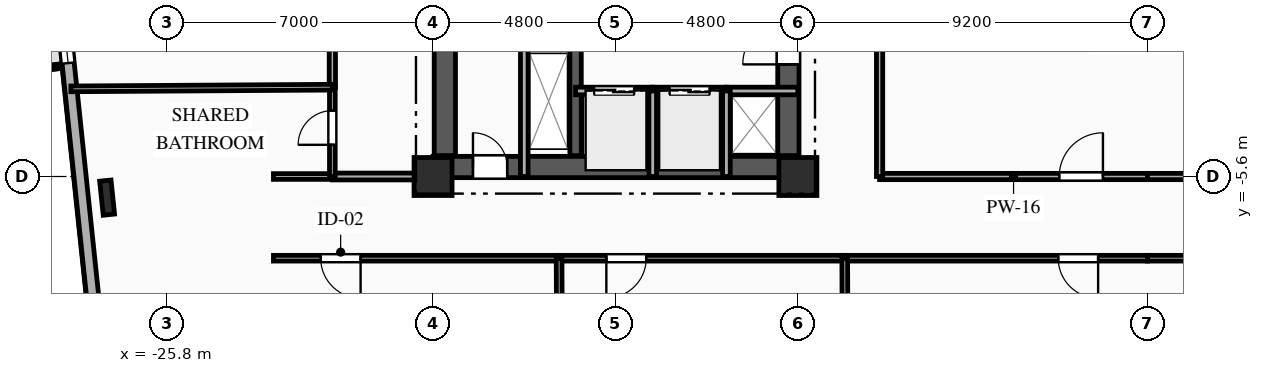
"""IFC4 building model, lengths in metres.
Left out: names, types, materials, properties, quantities, classifications, styles, units other than length and angle.
Written with IfcOpenShell. Run it as: python <this file> out.ifc"""

import sys

from ifc_helpers import new_model, si_unit, direction, frame, frame_2d, origin, origin_2d, place, context, subcontext, project, spatial, rectangle, i_section, extrude, element, fill, save


model = new_model("IFC4")
c1 = context("Model", 3, precision=1e-05, world=origin(), true_north=direction((0.0, 1.0)))
c2 = subcontext(c1, "Body", "Model", "MODEL_VIEW")
j1 = project(units=[si_unit("LENGTHUNIT", "METRE"), si_unit("PLANEANGLEUNIT", "RADIAN")], contexts=[c1])
p1 = place(None, origin())
s1 = spatial("IfcSite", under=j1, at=p1, CompositionType="ELEMENT")
p2 = place(p1, origin())
s2 = spatial("IfcBuilding", under=s1, at=p2, CompositionType="ELEMENT")
p3 = place(p2, frame((0.0, 0.0, 95.75)))
s3 = spatial("IfcBuildingStorey", under=s2, at=p3, CompositionType="ELEMENT", Elevation=95.75)
for number, where, z_axis, x_axis in (
    (1, (-18.8, -5.6, 0.0), (0.0, 0.0, 1.0), (1.0, 0.0, 0.0)),
    (2, (-9.2, -5.6, 0.0), (0.0, 0.0, 1.0), (1.0, 0.0, 0.0)),
):
    element("IfcColumn", number, at=place(p3, frame(where, z_axis=z_axis, x_axis=x_axis)), inside=s3, PredefinedType="COLUMN", context=c2, shape_type="SweptSolid", body=[
        extrude(rectangle(XDim=1.0, YDim=1.0, at=origin_2d()), origin(), (0.0, 0.0, 1.0), 3.35),
    ])
p4 = place(p3, frame((-27.377, -6.156, 0.0), z_axis=(0.0, 0.0, 1.0), x_axis=(0.994521895368, 0.104528463268, 0.0)))
e3 = element("IfcColumn", 3, at=p4, inside=s3, PredefinedType="COLUMN", context=c2, shape_type="SweptSolid", body=[
    extrude(i_section(OverallWidth=0.3, OverallDepth=0.9, WebThickness=0.019, FlangeThickness=0.035, FilletRadius=0.03, at=origin_2d()), origin(), (0.0, 0.0, 1.0), 3.35),
])
p5 = place(p3, frame((-26.935, -16.583, 0.0), z_axis=(0.0, 0.0, 1.0), x_axis=(-0.104524887486, 0.994522271192, 0.0)))
e4 = element("IfcWall", 4, at=p5, inside=s3, PredefinedType="SOLIDWALL", context=c2, shape_type="SweptSolid", body=[
    extrude(rectangle(XDim=30.6, YDim=0.32, at=frame_2d((15.3, 0.0))), origin(), (0.0, 0.0, 1.0), 3.045),
])
p6 = place(p5, frame((14.045, 0.0, 0.85)))
e5 = element("IfcOpeningElement", 5, at=p6, cuts=e4, PredefinedType="OPENING", context=c2, shape_type="SweptSolid", body=[
    extrude(rectangle(XDim=1.95, YDim=1.85, at=frame_2d((0.975, 0.925))), frame((0.0, 0.17, 0.0), z_axis=(0.0, -1.0, 0.0), x_axis=(1.0, 0.0, 0.0)), (0.0, 0.0, 1.0), 0.34),
])
p7 = place(p5, frame((17.354, 0.0, 0.85)))
e6 = element("IfcOpeningElement", 6, at=p7, cuts=e4, PredefinedType="OPENING", context=c2, shape_type="SweptSolid", body=[
    extrude(rectangle(XDim=1.5, YDim=1.85, at=frame_2d((0.75, 0.925))), frame((0.0, 0.17, 0.0), z_axis=(0.0, -1.0, 0.0), x_axis=(1.0, 0.0, 0.0)), (0.0, 0.0, 1.0), 0.34),
])
p8 = place(p5, frame((20.198, 0.0, 0.85)))
e7 = element("IfcOpeningElement", 7, at=p8, cuts=e4, PredefinedType="OPENING", context=c2, shape_type="SweptSolid", body=[
    extrude(rectangle(XDim=1.5, YDim=1.85, at=frame_2d((0.75, 0.925))), frame((0.0, 0.17, 0.0), z_axis=(0.0, -1.0, 0.0), x_axis=(1.0, 0.0, 0.0)), (0.0, 0.0, 1.0), 0.34),
])
p9 = place(p5, frame((23.041, 0.0, 0.85)))
e8 = element("IfcOpeningElement", 8, at=p9, cuts=e4, PredefinedType="OPENING", context=c2, shape_type="SweptSolid", body=[
    extrude(rectangle(XDim=1.5, YDim=1.85, at=frame_2d((0.75, 0.925))), frame((0.0, 0.17, 0.0), z_axis=(0.0, -1.0, 0.0), x_axis=(1.0, 0.0, 0.0)), (0.0, 0.0, 1.0), 0.34),
])
p10 = place(p3, frame((-18.8, -5.35, 0.0), z_axis=(0.0, 0.0, 1.0), x_axis=(1.0, 0.0, 0.0)))
e9 = element("IfcWall", 9, at=p10, inside=s3, PredefinedType="SHEAR", context=c2, shape_type="SweptSolid", body=[
    extrude(rectangle(XDim=9.6, YDim=0.56, at=frame_2d((4.8, 0.0))), origin(), (0.0, 0.0, 1.0), 3.045),
])
p11 = place(p10, frame((1.05, 0.0, 0.0)))
e10 = element("IfcOpeningElement", 10, at=p11, cuts=e9, PredefinedType="OPENING", context=c2, shape_type="SweptSolid", body=[
    extrude(rectangle(XDim=0.9, YDim=2.1, at=frame_2d((0.45, 1.05))), frame((0.0, 0.29, 0.0), z_axis=(0.0, -1.0, 0.0), x_axis=(1.0, 0.0, 0.0)), (0.0, 0.0, 1.0), 0.58),
])
p12 = place(p3, frame((-18.49, -5.05, 0.0), z_axis=(0.0, 0.0, 1.0), x_axis=(0.0, 1.0, 0.0)))
e11 = element("IfcWall", 11, at=p12, inside=s3, PredefinedType="SHEAR", context=c2, shape_type="SweptSolid", body=[
    extrude(rectangle(XDim=10.1, YDim=0.56, at=frame_2d((5.05, 0.0))), origin(), (0.0, 0.0, 1.0), 3.045),
])
p13 = place(p3, frame((-9.45, -5.05, 0.0), z_axis=(0.0, 0.0, 1.0), x_axis=(0.0, 1.0, 0.0)))
e12 = element("IfcWall", 12, at=p13, inside=s3, PredefinedType="SHEAR", context=c2, shape_type="SweptSolid", body=[
    extrude(rectangle(XDim=10.1, YDim=0.56, at=frame_2d((5.05, 0.0))), origin(), (0.0, 0.0, 1.0), 3.045),
])
p14 = place(p13, frame((7.15, 0.0, 0.0)))
e13 = element("IfcOpeningElement", 13, at=p14, cuts=e12, PredefinedType="OPENING", context=c2, shape_type="SweptSolid", body=[
    extrude(rectangle(XDim=0.9, YDim=2.1, at=frame_2d((0.45, 1.05))), frame((0.0, 0.29, 0.0), z_axis=(0.0, -1.0, 0.0), x_axis=(1.0, 0.0, 0.0)), (0.0, 0.0, 1.0), 0.58),
])
p15 = place(p13, frame((2.4, 0.0, 0.0)))
e14 = element("IfcOpeningElement", 14, at=p15, cuts=e12, PredefinedType="OPENING", context=c2, shape_type="SweptSolid", body=[
    extrude(rectangle(XDim=1.2, YDim=2.15, at=frame_2d((0.6, 1.075))), frame((0.0, 0.29, 0.0), z_axis=(0.0, -1.0, 0.0), x_axis=(1.0, 0.0, 0.0)), (0.0, 0.0, 1.0), 0.58),
])
p16 = place(p3, frame((-15.05, -5.05, 0.0), z_axis=(0.0, 0.0, 1.0), x_axis=(0.0, 1.0, 0.0)))
e15 = element("IfcWall", 15, at=p16, inside=s3, PredefinedType="SHEAR", context=c2, shape_type="SweptSolid", body=[
    extrude(rectangle(XDim=10.1, YDim=0.3, at=frame_2d((5.05, 0.0))), origin(), (0.0, 0.0, 1.0), 3.045),
])
p17 = place(p3, frame((-16.4, -5.6, 0.0), z_axis=(0.0, 0.0, 1.0), x_axis=(0.0, 1.0, 0.0)))
e16 = element("IfcWall", 16, at=p17, inside=s3, PredefinedType="PARTITIONING", context=c2, shape_type="SweptSolid", body=[
    extrude(rectangle(XDim=3.49, YDim=0.2, at=frame_2d((1.745, 0.0))), origin(), (0.0, 0.0, 1.0), 3.045),
])
p18 = place(p3, frame((-15.05, -3.35, 0.0), z_axis=(0.0, 0.0, 1.0), x_axis=(1.0, 0.0, 0.0)))
e17 = element("IfcWall", 17, at=p18, inside=s3, PredefinedType="PARTITIONING", context=c2, shape_type="SweptSolid", body=[
    extrude(rectangle(XDim=2.03, YDim=0.2, at=frame_2d((1.015, 0.0))), origin(), (0.0, 0.0, 1.0), 3.045),
])
p19 = place(p18, frame((0.49, 0.0, 0.0)))
e18 = element("IfcOpeningElement", 18, at=p19, cuts=e17, PredefinedType="OPENING", context=c2, shape_type="SweptSolid", body=[
    extrude(rectangle(XDim=1.05, YDim=2.1, at=frame_2d((0.525, 1.05))), frame((0.0, 0.11, 0.0), z_axis=(0.0, -1.0, 0.0), x_axis=(1.0, 0.0, 0.0)), (0.0, 0.0, 1.0), 0.22),
])
p20 = place(p3, frame((-13.02, -3.35, 0.0), z_axis=(0.0, 0.0, 1.0), x_axis=(1.0, 0.0, 0.0)))
e19 = element("IfcWall", 19, at=p20, inside=s3, PredefinedType="PARTITIONING", context=c2, shape_type="SweptSolid", body=[
    extrude(rectangle(XDim=1.94, YDim=0.2, at=frame_2d((0.97, 0.0))), origin(), (0.0, 0.0, 1.0), 3.045),
])
p21 = place(p20, frame((0.445, 0.0, 0.0)))
e20 = element("IfcOpeningElement", 20, at=p21, cuts=e19, PredefinedType="OPENING", context=c2, shape_type="SweptSolid", body=[
    extrude(rectangle(XDim=1.05, YDim=2.1, at=frame_2d((0.525, 1.05))), frame((0.0, 0.11, 0.0), z_axis=(0.0, -1.0, 0.0), x_axis=(1.0, 0.0, 0.0)), (0.0, 0.0, 1.0), 0.22),
])
p22 = place(p3, frame((-11.08, -3.35, 0.0), z_axis=(0.0, 0.0, 1.0), x_axis=(1.0, 0.0, 0.0)))
e21 = element("IfcWall", 21, at=p22, inside=s3, PredefinedType="PARTITIONING", context=c2, shape_type="SweptSolid", body=[
    extrude(rectangle(XDim=1.88, YDim=0.2, at=frame_2d((0.94, 0.0))), origin(), (0.0, 0.0, 1.0), 2.76),
])
for number, where, z_axis, x_axis in (
    (22, (-13.02, -5.6, 0.0), (0.0, 0.0, 1.0), (0.0, 1.0, 0.0)),
    (23, (-11.08, -5.6, 0.0), (0.0, 0.0, 1.0), (0.0, 1.0, 0.0)),
):
    element("IfcWall", number, at=place(p3, frame(where, z_axis=z_axis, x_axis=x_axis)), inside=s3, PredefinedType="PARTITIONING", context=c2, shape_type="SweptSolid", body=[
        extrude(rectangle(XDim=2.25, YDim=0.2, at=frame_2d((1.125, 0.0))), origin(), (0.0, 0.0, 1.0), 3.045),
    ])
p23 = place(p3, frame((-21.45, -5.6, 0.0), z_axis=(0.0, 0.0, 1.0), x_axis=(1.0, 0.0, 0.0)))
e24 = element("IfcWall", 24, at=p23, inside=s3, PredefinedType="PARTITIONING", context=c2, shape_type="SweptSolid", body=[
    extrude(rectangle(XDim=2.65, YDim=0.18, at=frame_2d((1.325, 0.0))), origin(), (0.0, 0.0, 1.0), 3.045),
])
p24 = place(p3, frame((-23.0, -5.6, 0.0), z_axis=(0.0, 0.0, 1.0), x_axis=(1.0, 0.0, 0.0)))
e25 = element("IfcWall", 25, at=p24, inside=s3, PredefinedType="PLUMBINGWALL", context=c2, shape_type="SweptSolid", body=[
    extrude(rectangle(XDim=1.55, YDim=0.15, at=frame_2d((0.775, 0.0))), origin(), (0.0, 0.0, 1.0), 3.045),
])
p25 = place(p3, frame((-15.483, -7.75, 0.0), z_axis=(0.0, 0.0, 1.0), x_axis=(-1.0, 0.0, 0.0)))
e26 = element("IfcWall", 26, at=p25, inside=s3, PredefinedType="PARTITIONING", context=c2, shape_type="SweptSolid", body=[
    extrude(rectangle(XDim=7.517, YDim=0.15, at=frame_2d((3.758, 0.0))), origin(), (0.0, 0.0, 1.0), 3.045),
])
p26 = place(p25, frame((5.223, 0.0, 0.0)))
e27 = element("IfcOpeningElement", 27, at=p26, cuts=e26, PredefinedType="OPENING", context=c2, shape_type="SweptSolid", body=[
    extrude(rectangle(XDim=1.05, YDim=2.15, at=frame_2d((0.525, 1.075))), frame((0.0, 0.085, 0.0), z_axis=(0.0, -1.0, 0.0), x_axis=(1.0, 0.0, 0.0)), (0.0, 0.0, 1.0), 0.17),
])
p27 = place(p3, frame((-7.967, -7.75, 0.0), z_axis=(0.0, 0.0, 1.0), x_axis=(-1.0, 0.0, 0.0)))
e28 = element("IfcWall", 28, at=p27, inside=s3, PredefinedType="PARTITIONING", context=c2, shape_type="SweptSolid", body=[
    extrude(rectangle(XDim=7.516, YDim=0.15, at=frame_2d((3.758, 0.0))), origin(), (0.0, 0.0, 1.0), 3.045),
])
p28 = place(p27, frame((5.223, 0.0, 0.0)))
e29 = element("IfcOpeningElement", 29, at=p28, cuts=e28, PredefinedType="OPENING", context=c2, shape_type="SweptSolid", body=[
    extrude(rectangle(XDim=1.05, YDim=2.15, at=frame_2d((0.525, 1.075))), frame((0.0, 0.085, 0.0), z_axis=(0.0, -1.0, 0.0), x_axis=(1.0, 0.0, 0.0)), (0.0, 0.0, 1.0), 0.17),
])
p29 = place(p3, frame((0.0, -7.75, 0.0), z_axis=(0.0, 0.0, 1.0), x_axis=(-1.0, 0.0, 0.0)))
e30 = element("IfcWall", 30, at=p29, inside=s3, PredefinedType="PARTITIONING", context=c2, shape_type="SweptSolid", body=[
    extrude(rectangle(XDim=7.967, YDim=0.15, at=frame_2d((3.983, 0.0))), origin(), (0.0, 0.0, 1.0), 3.045),
])
p30 = place(p29, frame((1.3, 0.0, 0.0)))
e31 = element("IfcOpeningElement", 31, at=p30, cuts=e30, PredefinedType="OPENING", context=c2, shape_type="SweptSolid", body=[
    extrude(rectangle(XDim=1.05, YDim=2.15, at=frame_2d((0.525, 1.075))), frame((0.0, 0.085, 0.0), z_axis=(0.0, -1.0, 0.0), x_axis=(1.0, 0.0, 0.0)), (0.0, 0.0, 1.0), 0.17),
])
p31 = place(p3, frame((-7.05, -5.6, 0.0), z_axis=(0.0, 0.0, 1.0), x_axis=(1.0, 0.0, 0.0)))
e32 = element("IfcWall", 32, at=p31, inside=s3, PredefinedType="PARTITIONING", context=c2, shape_type="SweptSolid", body=[
    extrude(rectangle(XDim=7.05, YDim=0.165, at=frame_2d((3.525, 0.0))), origin(), (0.0, 0.0, 1.0), 2.53),
])
p32 = place(p31, frame((4.728, 0.0, 0.0)))
e33 = element("IfcOpeningElement", 33, at=p32, cuts=e32, PredefinedType="OPENING", context=c2, shape_type="SweptSolid", body=[
    extrude(rectangle(XDim=1.15, YDim=2.15, at=frame_2d((0.575, 1.075))), frame((0.0, 0.093, 0.0), z_axis=(0.0, -1.0, 0.0), x_axis=(1.0, 0.0, 0.0)), (0.0, 0.0, 1.0), 0.185),
])
p33 = place(p3, frame((7.367, -7.75, 0.0), z_axis=(0.0, 0.0, 1.0), x_axis=(-1.0, 0.0, 0.0)))
e34 = element("IfcWall", 34, at=p33, inside=s3, PredefinedType="PARTITIONING", context=c2, shape_type="SweptSolid", body=[
    extrude(rectangle(XDim=7.367, YDim=0.15, at=frame_2d((3.684, 0.0))), origin(), (0.0, 0.0, 1.0), 3.045),
])
p34 = place(p3, frame((0.0, -5.6, 0.0), z_axis=(0.0, 0.0, 1.0), x_axis=(1.0, 0.0, 0.0)))
e35 = element("IfcWall", 35, at=p34, inside=s3, PredefinedType="PARTITIONING", context=c2, shape_type="SweptSolid", body=[
    extrude(rectangle(XDim=7.05, YDim=0.165, at=frame_2d((3.525, 0.0))), origin(), (0.0, 0.0, 1.0), 2.53),
])
p35 = place(p3, frame((-7.05, 1.45, 0.0), z_axis=(0.0, 0.0, 1.0), x_axis=(0.0, -1.0, 0.0)))
e36 = element("IfcWall", 36, at=p35, inside=s3, PredefinedType="PARTITIONING", context=c2, shape_type="SweptSolid", body=[
    extrude(rectangle(XDim=7.05, YDim=0.165, at=frame_2d((3.525, 0.0))), origin(), (0.0, 0.0, 1.0), 3.045),
])
p36 = place(p3, frame((-21.45, -5.6, 0.0), z_axis=(0.0, 0.0, 1.0), x_axis=(0.0, 1.0, 0.0)))
e37 = element("IfcWall", 37, at=p36, inside=s3, PredefinedType="PLUMBINGWALL", context=c2, shape_type="SweptSolid", body=[
    extrude(rectangle(XDim=2.35, YDim=0.15, at=frame_2d((1.175, 0.0))), origin(), (0.0, 0.0, 1.0), 3.045),
])
p37 = place(p36, frame((0.834, 0.0, 0.0)))
e38 = element("IfcOpeningElement", 38, at=p37, cuts=e37, PredefinedType="OPENING", context=c2, shape_type="SweptSolid", body=[
    extrude(rectangle(XDim=0.9, YDim=2.1, at=frame_2d((0.45, 1.05))), frame((0.0, 0.085, 0.0), z_axis=(0.0, -1.0, 0.0), x_axis=(1.0, 0.0, 0.0)), (0.0, 0.0, 1.0), 0.17),
])
p38 = place(p3, frame((-21.45, -3.25, 0.0), z_axis=(0.0, 0.0, 1.0), x_axis=(0.0, 1.0, 0.0)))
e39 = element("IfcWall", 39, at=p38, inside=s3, PredefinedType="PARTITIONING", context=c2, shape_type="SweptSolid", body=[
    extrude(rectangle(XDim=3.29, YDim=0.165, at=frame_2d((1.645, 0.0))), origin(), (0.0, 0.0, 1.0), 3.045),
])
p39 = place(p38, frame((1.438, 0.0, 0.0)))
e40 = element("IfcOpeningElement", 40, at=p39, cuts=e39, PredefinedType="OPENING", context=c2, shape_type="SweptSolid", body=[
    extrude(rectangle(XDim=1.15, YDim=2.15, at=frame_2d((0.575, 1.075))), frame((0.0, 0.093, 0.0), z_axis=(0.0, -1.0, 0.0), x_axis=(1.0, 0.0, 0.0)), (0.0, 0.0, 1.0), 0.185),
])
p40 = place(p3, frame((-28.332, -3.294, 0.0), z_axis=(0.0, 0.0, 1.0), x_axis=(0.99997961062, 0.006385792383, 0.0)))
e41 = element("IfcWall", 41, at=p40, inside=s3, PredefinedType="PLUMBINGWALL", context=c2, shape_type="SweptSolid", body=[
    extrude(rectangle(XDim=6.882, YDim=0.15, at=frame_2d((3.441, 0.0))), origin(), (0.0, 0.0, 1.0), 3.045),
])
p41 = place(p3, frame((-15.483, -7.75, 0.0), z_axis=(0.0, 0.0, 1.0), x_axis=(0.003956994399, -0.999992171067, 0.0)))
e42 = element("IfcWall", 42, at=p41, inside=s3, PredefinedType="PARTITIONING", context=c2, shape_type="SweptSolid", body=[
    extrude(rectangle(XDim=11.044, YDim=0.15, at=frame_2d((5.522, 0.0))), origin(), (0.0, 0.0, 1.0), 3.045),
])
p42 = place(p3, frame((-7.967, -7.75, 0.0), z_axis=(0.0, 0.0, 1.0), x_axis=(0.004285674928, -0.999990816453, 0.0)))
e43 = element("IfcWall", 43, at=p42, inside=s3, PredefinedType="PARTITIONING", context=c2, shape_type="SweptSolid", body=[
    extrude(rectangle(XDim=10.254, YDim=0.15, at=frame_2d((5.127, 0.0))), origin(), (0.0, 0.0, 1.0), 3.045),
])
p43 = place(p6, origin())
e44 = element("IfcWindow", 44, at=p43, inside=s3, PartitioningType="SINGLE_PANEL", PredefinedType="WINDOW", context=c2, shape_type="SweptSolid", body=[
    extrude(rectangle(XDim=1.95, YDim=1.85, at=frame_2d((0.975, 0.925))), frame((0.0, 0.03, 0.0), z_axis=(0.0, -1.0, 0.0), x_axis=(1.0, 0.0, 0.0)), (0.0, 0.0, 1.0), 0.06),
])
fill(e5, e44)
p44 = place(p11, origin())
e45 = element("IfcDoor", 45, at=p44, inside=s3, OperationType="SINGLE_SWING_LEFT", PredefinedType="DOOR", context=c2, shape_type="SweptSolid", body=[
    extrude(rectangle(XDim=0.9, YDim=2.1, at=frame_2d((0.45, 1.05))), frame((0.0, 0.025, 0.0), z_axis=(0.0, -1.0, 0.0), x_axis=(1.0, 0.0, 0.0)), (0.0, 0.0, 1.0), 0.05),
])
fill(e10, e45)
p45 = place(p19, origin())
e46 = element("IfcDoor", 46, at=p45, inside=s3, OperationType="DOUBLE_DOOR_SLIDING", PredefinedType="DOOR", context=c2, shape_type="SweptSolid", body=[
    extrude(rectangle(XDim=1.05, YDim=2.1, at=frame_2d((0.525, 1.05))), frame((0.0, 0.025, 0.0), z_axis=(0.0, -1.0, 0.0), x_axis=(1.0, 0.0, 0.0)), (0.0, 0.0, 1.0), 0.05),
])
fill(e18, e46)
p46 = place(p21, origin())
e47 = element("IfcDoor", 47, at=p46, inside=s3, OperationType="DOUBLE_DOOR_SLIDING", PredefinedType="DOOR", context=c2, shape_type="SweptSolid", body=[
    extrude(rectangle(XDim=1.05, YDim=2.1, at=frame_2d((0.525, 1.05))), frame((0.0, 0.025, 0.0), z_axis=(0.0, -1.0, 0.0), x_axis=(1.0, 0.0, 0.0)), (0.0, 0.0, 1.0), 0.05),
])
fill(e20, e47)
p47 = place(p15, origin())
e48 = element("IfcDoor", 48, at=p47, inside=s3, OperationType="SINGLE_SWING_LEFT", PredefinedType="DOOR", context=c2, shape_type="SweptSolid", body=[
    extrude(rectangle(XDim=1.2, YDim=2.15, at=frame_2d((0.6, 1.075))), frame((0.0, 0.025, 0.0), z_axis=(0.0, -1.0, 0.0), x_axis=(1.0, 0.0, 0.0)), (0.0, 0.0, 1.0), 0.05),
])
fill(e14, e48)
p48 = place(p26, origin())
e49 = element("IfcDoor", 49, at=p48, inside=s3, OperationType="SINGLE_SWING_LEFT", PredefinedType="DOOR", context=c2, shape_type="SweptSolid", body=[
    extrude(rectangle(XDim=1.05, YDim=2.15, at=frame_2d((0.525, 1.075))), frame((0.0, 0.025, 0.0), z_axis=(0.0, -1.0, 0.0), x_axis=(1.0, 0.0, 0.0)), (0.0, 0.0, 1.0), 0.05),
])
fill(e27, e49)
p49 = place(p28, origin())
e50 = element("IfcDoor", 50, at=p49, inside=s3, OperationType="SINGLE_SWING_RIGHT", PredefinedType="DOOR", context=c2, shape_type="SweptSolid", body=[
    extrude(rectangle(XDim=1.05, YDim=2.15, at=frame_2d((0.525, 1.075))), frame((0.0, 0.025, 0.0), z_axis=(0.0, -1.0, 0.0), x_axis=(1.0, 0.0, 0.0)), (0.0, 0.0, 1.0), 0.05),
])
fill(e29, e50)
p50 = place(p30, origin())
e51 = element("IfcDoor", 51, at=p50, inside=s3, OperationType="SINGLE_SWING_LEFT", PredefinedType="DOOR", context=c2, shape_type="SweptSolid", body=[
    extrude(rectangle(XDim=1.05, YDim=2.15, at=frame_2d((0.525, 1.075))), frame((0.0, 0.025, 0.0), z_axis=(0.0, -1.0, 0.0), x_axis=(1.0, 0.0, 0.0)), (0.0, 0.0, 1.0), 0.05),
])
fill(e31, e51)
p51 = place(p32, origin())
e52 = element("IfcDoor", 52, at=p51, inside=s3, OperationType="SINGLE_SWING_RIGHT", PredefinedType="DOOR", context=c2, shape_type="SweptSolid", body=[
    extrude(rectangle(XDim=1.15, YDim=2.15, at=frame_2d((0.575, 1.075))), frame((0.0, 0.025, 0.0), z_axis=(0.0, -1.0, 0.0), x_axis=(1.0, 0.0, 0.0)), (0.0, 0.0, 1.0), 0.05),
])
fill(e33, e52)
p52 = place(p37, origin())
e53 = element("IfcDoor", 53, at=p52, inside=s3, OperationType="SINGLE_SWING_LEFT", PredefinedType="DOOR", context=c2, shape_type="SweptSolid", body=[
    extrude(rectangle(XDim=0.9, YDim=2.1, at=frame_2d((0.45, 1.05))), frame((0.0, 0.025, 0.0), z_axis=(0.0, -1.0, 0.0), x_axis=(1.0, 0.0, 0.0)), (0.0, 0.0, 1.0), 0.05),
])
fill(e38, e53)
save(model, sys.argv[1])
